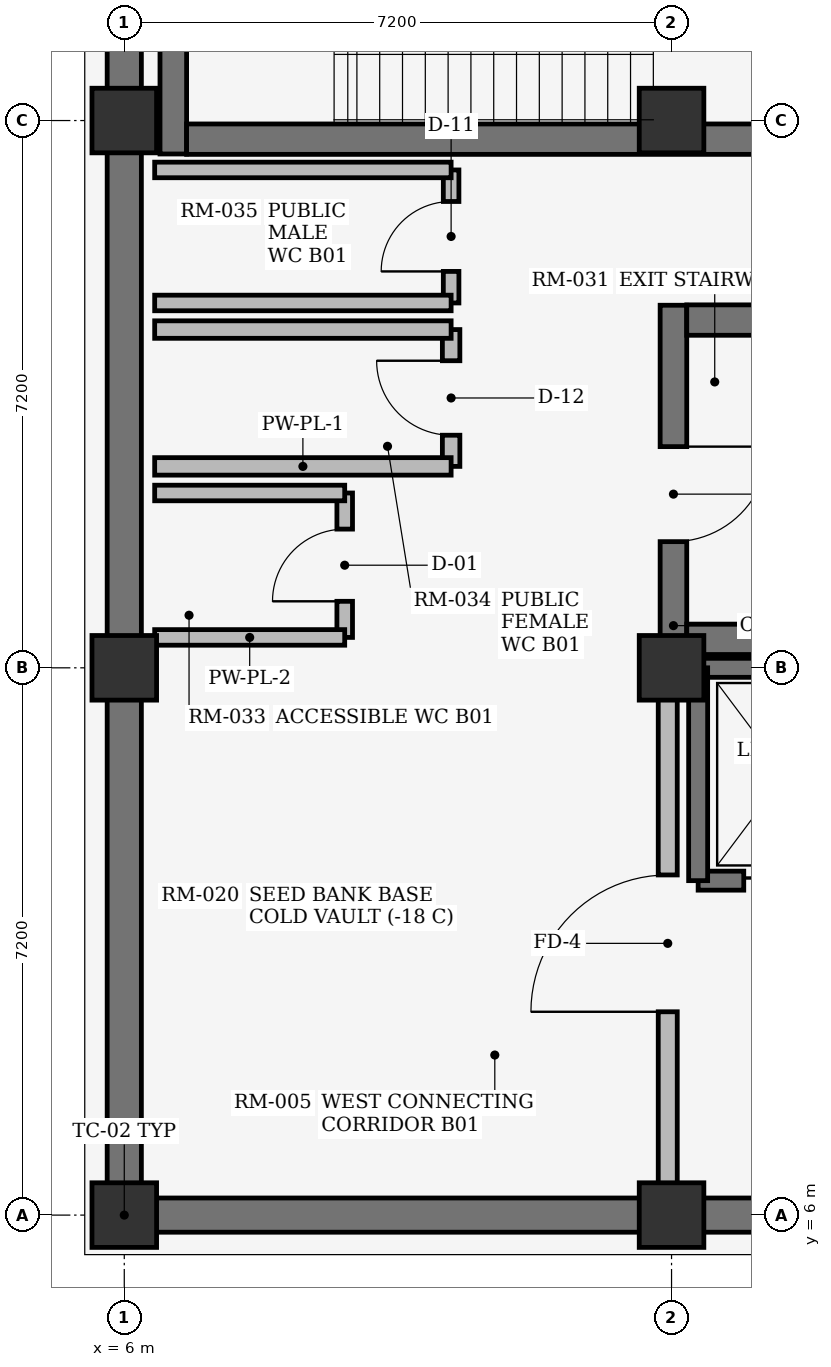
"""IFC4 building model, lengths in metres.
Left out: names, types, materials, properties, quantities, classifications, styles, units other than length and angle.
Written with IfcOpenShell. Run it as: python <this file> out.ifc"""

import sys

from ifc_helpers import new_model, si_unit, direction, frame, frame_2d, origin, origin_2d, place, context, subcontext, project, spatial, rectangle, extrude, element, fill, save


model = new_model("IFC4")
c1 = context("Model", 3, precision=1e-05, world=origin(), true_north=direction((0.0, 1.0)))
c2 = subcontext(c1, "Body", "Model", "MODEL_VIEW")
j1 = project(units=[si_unit("LENGTHUNIT", "METRE"), si_unit("PLANEANGLEUNIT", "RADIAN")], contexts=[c1])
p1 = place(None, origin())
s1 = spatial("IfcSite", under=j1, at=p1, CompositionType="ELEMENT")
p2 = place(p1, origin())
s2 = spatial("IfcBuilding", under=s1, at=p2, CompositionType="ELEMENT")
p3 = place(p2, frame((0.0, 0.0, -4.8)))
s3 = spatial("IfcBuildingStorey", under=s2, at=p3, CompositionType="ELEMENT", Elevation=-4.8)
for number, where, z_axis, x_axis in (
    (1, (6.0, 6.0, 0.0), (0.0, 0.0, 1.0), (1.0, 0.0, 0.0)),
    (2, (6.0, 13.2, 0.0), (0.0, 0.0, 1.0), (1.0, 0.0, 0.0)),
    (3, (6.0, 20.4, 0.0), (0.0, 0.0, 1.0), (1.0, 0.0, 0.0)),
    (4, (13.2, 6.0, 0.0), (0.0, 0.0, 1.0), (1.0, 0.0, 0.0)),
    (5, (13.2, 13.2, 0.0), (0.0, 0.0, 1.0), (1.0, 0.0, 0.0)),
    (6, (13.2, 20.4, 0.0), (0.0, 0.0, 1.0), (1.0, 0.0, 0.0)),
):
    element("IfcColumn", number, at=place(p3, frame(where, z_axis=z_axis, x_axis=x_axis)), inside=s3, PredefinedType="COLUMN", context=c2, shape_type="SweptSolid", body=[
        extrude(rectangle(XDim=0.85, YDim=0.85, at=origin_2d()), origin(), (0.0, 0.0, 1.0), 4.5),
    ])
p4 = place(p3, frame((6.0, 6.0, 0.0), z_axis=(0.0, 0.0, 1.0), x_axis=(1.0, 0.0, 0.0)))
e7 = element("IfcWall", 7, at=p4, inside=s3, PredefinedType="USERDEFINED", context=c2, shape_type="SweptSolid", body=[
    extrude(rectangle(XDim=36.0, YDim=0.45, at=frame_2d((18.0, 0.0))), origin(), (0.0, 0.0, 1.0), 4.5),
])
p5 = place(p3, frame((6.0, 34.8, 0.0), z_axis=(0.0, 0.0, 1.0), x_axis=(0.0, -1.0, 0.0)))
e8 = element("IfcWall", 8, at=p5, inside=s3, PredefinedType="USERDEFINED", context=c2, shape_type="SweptSolid", body=[
    extrude(rectangle(XDim=28.8, YDim=0.45, at=frame_2d((14.4, 0.0))), origin(), (0.0, 0.0, 1.0), 4.5),
])
p6 = place(p3, frame((13.225, 13.0, 0.0), z_axis=(0.0, 0.0, 1.0), x_axis=(0.0, 1.0, 0.0)))
e9 = element("IfcWall", 9, at=p6, inside=s3, PredefinedType="SHEAR", context=c2, shape_type="SweptSolid", body=[
    extrude(rectangle(XDim=4.97, YDim=0.35, at=frame_2d((2.485, 0.0))), origin(), (0.0, 0.0, 1.0), 4.5),
])
p7 = place(p6, frame((1.86, 0.0, 0.0)))
e10 = element("IfcOpeningElement", 10, at=p7, cuts=e9, PredefinedType="OPENING", context=c2, shape_type="SweptSolid", body=[
    extrude(rectangle(XDim=1.25, YDim=2.2, at=frame_2d((0.625, 1.1))), frame((0.0, 0.185, 0.0), z_axis=(0.0, -1.0, 0.0), x_axis=(1.0, 0.0, 0.0)), (0.0, 0.0, 1.0), 0.37),
])
for number, where, z_axis, x_axis in (
    (11, (13.4, 13.575, 0.0), (0.0, 0.0, 1.0), (1.0, 0.0, 0.0)),
    (12, (13.4, 17.775, 0.0), (0.0, 0.0, 1.0), (1.0, 0.0, 0.0)),
):
    element("IfcWall", number, at=place(p3, frame(where, z_axis=z_axis, x_axis=x_axis)), inside=s3, PredefinedType="SHEAR", context=c2, shape_type="SweptSolid", body=[
        extrude(rectangle(XDim=7.98, YDim=0.4, at=frame_2d((3.99, 0.0))), origin(), (0.0, 0.0, 1.0), 4.5),
    ])
p8 = place(p3, frame((6.645, 24.55, 0.0), z_axis=(0.0, 0.0, 1.0), x_axis=(0.0, -1.0, 0.0)))
e13 = element("IfcWall", 13, at=p8, inside=s3, PredefinedType="SHEAR", context=c2, shape_type="SweptSolid", body=[
    extrude(rectangle(XDim=4.59, YDim=0.35, at=frame_2d((2.295, 0.0))), origin(), (0.0, 0.0, 1.0), 4.5),
])
p9 = place(p3, frame((14.8, 20.155, 0.0), z_axis=(0.0, 0.0, 1.0), x_axis=(-1.0, 0.0, 0.0)))
e14 = element("IfcWall", 14, at=p9, inside=s3, PredefinedType="SHEAR", context=c2, shape_type="SweptSolid", body=[
    extrude(rectangle(XDim=7.98, YDim=0.4, at=frame_2d((3.99, 0.0))), origin(), (0.0, 0.0, 1.0), 4.5),
])
p10 = place(p3, frame((13.55, 10.4, 0.0), z_axis=(0.0, 0.0, 1.0), x_axis=(1.0, 0.0, 0.0)))
e15 = element("IfcWall", 15, at=p10, inside=s3, PredefinedType="SHEAR", context=c2, shape_type="SweptSolid", body=[
    extrude(rectangle(XDim=2.3, YDim=0.25, at=frame_2d((1.15, 0.0))), origin(), (0.0, 0.0, 1.0), 4.5),
])
p11 = place(p10, frame((0.6, 0.0, 0.0)))
e16 = element("IfcOpeningElement", 16, at=p11, cuts=e15, PredefinedType="OPENING", context=c2, shape_type="SweptSolid", body=[
    extrude(rectangle(XDim=1.1, YDim=2.2, at=frame_2d((0.55, 1.1))), frame((0.0, 0.135, 0.0), z_axis=(0.0, -1.0, 0.0), x_axis=(1.0, 0.0, 0.0)), (0.0, 0.0, 1.0), 0.27),
])
p12 = place(p3, frame((13.55, 13.2, 0.0), z_axis=(0.0, 0.0, 1.0), x_axis=(1.0, 0.0, 0.0)))
e17 = element("IfcWall", 17, at=p12, inside=s3, PredefinedType="SHEAR", context=c2, shape_type="SweptSolid", body=[
    extrude(rectangle(XDim=2.3, YDim=0.25, at=frame_2d((1.15, 0.0))), origin(), (0.0, 0.0, 1.0), 4.5),
])
p13 = place(p3, frame((13.55, 10.4, 0.0), z_axis=(0.0, 0.0, 1.0), x_axis=(0.0, 1.0, 0.0)))
e18 = element("IfcWall", 18, at=p13, inside=s3, PredefinedType="SHEAR", context=c2, shape_type="SweptSolid", body=[
    extrude(rectangle(XDim=2.8, YDim=0.25, at=frame_2d((1.4, 0.0))), origin(), (0.0, 0.0, 1.0), 4.5),
])
p14 = place(p3, frame((8.9, 13.6, 0.0), z_axis=(0.0, 0.0, 1.0), x_axis=(0.0, 1.0, 0.0)))
e19 = element("IfcWall", 19, at=p14, inside=s3, PredefinedType="PLUMBINGWALL", context=c2, shape_type="SweptSolid", body=[
    extrude(rectangle(XDim=1.9, YDim=0.205, at=frame_2d((0.95, 0.0))), origin(), (0.0, 0.0, 1.0), 4.48),
])
p15 = place(p14, frame((0.475, 0.0, 0.0)))
e20 = element("IfcOpeningElement", 20, at=p15, cuts=e19, PredefinedType="OPENING", context=c2, shape_type="SweptSolid", body=[
    extrude(rectangle(XDim=0.95, YDim=2.15, at=frame_2d((0.475, 1.075))), frame((0.0, 0.113, 0.0), z_axis=(0.0, -1.0, 0.0), x_axis=(1.0, 0.0, 0.0)), (0.0, 0.0, 1.0), 0.225),
])
for number, where, z_axis, x_axis in (
    (21, (6.4, 13.6, 0.0), (0.0, 0.0, 1.0), (1.0, 0.0, 0.0)),
    (22, (6.4, 15.5, 0.0), (0.0, 0.0, 1.0), (1.0, 0.0, 0.0)),
):
    element("IfcWall", number, at=place(p3, frame(where, z_axis=z_axis, x_axis=x_axis)), inside=s3, PredefinedType="PLUMBINGWALL", context=c2, shape_type="SweptSolid", body=[
        extrude(rectangle(XDim=2.5, YDim=0.205, at=frame_2d((1.25, 0.0))), origin(), (0.0, 0.0, 1.0), 4.48),
    ])
p16 = place(p3, frame((10.3, 15.85, 0.0), z_axis=(0.0, 0.0, 1.0), x_axis=(0.0, 1.0, 0.0)))
e23 = element("IfcWall", 23, at=p16, inside=s3, PredefinedType="PLUMBINGWALL", context=c2, shape_type="SweptSolid", body=[
    extrude(rectangle(XDim=1.8, YDim=0.23, at=frame_2d((0.9, 0.0))), origin(), (0.0, 0.0, 1.0), 4.48),
])
p17 = place(p16, frame((0.41, 0.0, 0.0)))
e24 = element("IfcOpeningElement", 24, at=p17, cuts=e23, PredefinedType="OPENING", context=c2, shape_type="SweptSolid", body=[
    extrude(rectangle(XDim=0.98, YDim=2.1, at=frame_2d((0.49, 1.05))), frame((0.0, 0.125, 0.0), z_axis=(0.0, -1.0, 0.0), x_axis=(1.0, 0.0, 0.0)), (0.0, 0.0, 1.0), 0.25),
])
for number, where, z_axis, x_axis in (
    (25, (6.4, 15.85, 0.0), (0.0, 0.0, 1.0), (1.0, 0.0, 0.0)),
    (26, (6.4, 17.65, 0.0), (0.0, 0.0, 1.0), (1.0, 0.0, 0.0)),
):
    element("IfcWall", number, at=place(p3, frame(where, z_axis=z_axis, x_axis=x_axis)), inside=s3, PredefinedType="PLUMBINGWALL", context=c2, shape_type="SweptSolid", body=[
        extrude(rectangle(XDim=3.9, YDim=0.23, at=frame_2d((1.95, 0.0))), origin(), (0.0, 0.0, 1.0), 4.48),
    ])
p18 = place(p3, frame((10.3, 18.0, 0.0), z_axis=(0.0, 0.0, 1.0), x_axis=(0.0, 1.0, 0.0)))
e27 = element("IfcWall", 27, at=p18, inside=s3, PredefinedType="PLUMBINGWALL", context=c2, shape_type="SweptSolid", body=[
    extrude(rectangle(XDim=1.75, YDim=0.205, at=frame_2d((0.875, 0.0))), origin(), (0.0, 0.0, 1.0), 4.48),
])
p19 = place(p18, frame((0.415, 0.0, 0.0)))
e28 = element("IfcOpeningElement", 28, at=p19, cuts=e27, PredefinedType="OPENING", context=c2, shape_type="SweptSolid", body=[
    extrude(rectangle(XDim=0.92, YDim=2.1, at=frame_2d((0.46, 1.05))), frame((0.0, 0.113, 0.0), z_axis=(0.0, -1.0, 0.0), x_axis=(1.0, 0.0, 0.0)), (0.0, 0.0, 1.0), 0.225),
])
for number, where, z_axis, x_axis in (
    (29, (6.4, 18.0, 0.0), (0.0, 0.0, 1.0), (1.0, 0.0, 0.0)),
    (30, (6.4, 19.75, 0.0), (0.0, 0.0, 1.0), (1.0, 0.0, 0.0)),
):
    element("IfcWall", number, at=place(p3, frame(where, z_axis=z_axis, x_axis=x_axis)), inside=s3, PredefinedType="PLUMBINGWALL", context=c2, shape_type="SweptSolid", body=[
        extrude(rectangle(XDim=3.9, YDim=0.205, at=frame_2d((1.95, 0.0))), origin(), (0.0, 0.0, 1.0), 4.48),
    ])
p20 = place(p3, frame((13.15, 6.05, 0.0), z_axis=(0.0, 0.0, 1.0), x_axis=(0.0, 1.0, 0.0)))
e31 = element("IfcWall", 31, at=p20, inside=s3, PredefinedType="SOLIDWALL", context=c2, shape_type="SweptSolid", body=[
    extrude(rectangle(XDim=7.05, YDim=0.25, at=frame_2d((3.525, 0.0))), origin(), (0.0, 0.0, 1.0), 3.89),
])
p21 = place(p20, frame((2.625, 0.0, 0.0)))
e32 = element("IfcOpeningElement", 32, at=p21, cuts=e31, PredefinedType="OPENING", context=c2, shape_type="SweptSolid", body=[
    extrude(rectangle(XDim=1.8, YDim=2.25, at=frame_2d((0.9, 1.125))), frame((0.0, 0.135, 0.0), z_axis=(0.0, -1.0, 0.0), x_axis=(1.0, 0.0, 0.0)), (0.0, 0.0, 1.0), 0.27),
])
p22 = place(p7, origin())
e33 = element("IfcDoor", 33, at=p22, inside=s3, OperationType="SINGLE_SWING_RIGHT", PredefinedType="DOOR", context=c2, shape_type="SweptSolid", body=[
    extrude(rectangle(XDim=1.25, YDim=2.2, at=frame_2d((0.625, 1.1))), frame((0.0, 0.025, 0.0), z_axis=(0.0, -1.0, 0.0), x_axis=(1.0, 0.0, 0.0)), (0.0, 0.0, 1.0), 0.05),
])
fill(e10, e33)
p23 = place(p11, origin())
e34 = element("IfcDoor", 34, at=p23, inside=s3, OperationType="DOUBLE_DOOR_SLIDING", PredefinedType="DOOR", context=c2, shape_type="SweptSolid", body=[
    extrude(rectangle(XDim=1.1, YDim=2.2, at=frame_2d((0.55, 1.1))), frame((0.0, 0.025, 0.0), z_axis=(0.0, -1.0, 0.0), x_axis=(1.0, 0.0, 0.0)), (0.0, 0.0, 1.0), 0.05),
])
fill(e16, e34)
p24 = place(p15, origin())
e35 = element("IfcDoor", 35, at=p24, inside=s3, OperationType="SINGLE_SWING_LEFT", PredefinedType="DOOR", context=c2, shape_type="SweptSolid", body=[
    extrude(rectangle(XDim=0.95, YDim=2.15, at=frame_2d((0.475, 1.075))), frame((0.0, 0.025, 0.0), z_axis=(0.0, -1.0, 0.0), x_axis=(1.0, 0.0, 0.0)), (0.0, 0.0, 1.0), 0.05),
])
fill(e20, e35)
p25 = place(p17, frame((0.98, 0.0, 0.0), z_axis=(0.0, 0.0, 1.0), x_axis=(-1.0, 0.0, 0.0)))
e36 = element("IfcDoor", 36, at=p25, inside=s3, OperationType="SINGLE_SWING_RIGHT", PredefinedType="DOOR", context=c2, shape_type="SweptSolid", body=[
    extrude(rectangle(XDim=0.98, YDim=2.1, at=frame_2d((0.49, 1.05))), frame((0.0, 0.025, 0.0), z_axis=(0.0, -1.0, 0.0), x_axis=(1.0, 0.0, 0.0)), (0.0, 0.0, 1.0), 0.05),
])
fill(e24, e36)
p26 = place(p19, origin())
e37 = element("IfcDoor", 37, at=p26, inside=s3, OperationType="SINGLE_SWING_LEFT", PredefinedType="DOOR", context=c2, shape_type="SweptSolid", body=[
    extrude(rectangle(XDim=0.92, YDim=2.1, at=frame_2d((0.46, 1.05))), frame((0.0, 0.025, 0.0), z_axis=(0.0, -1.0, 0.0), x_axis=(1.0, 0.0, 0.0)), (0.0, 0.0, 1.0), 0.05),
])
fill(e28, e37)
p27 = place(p21, origin())
e38 = element("IfcDoor", 38, at=p27, inside=s3, OperationType="DOUBLE_DOOR_SINGLE_SWING", PredefinedType="DOOR", context=c2, shape_type="SweptSolid", body=[
    extrude(rectangle(XDim=1.8, YDim=2.25, at=frame_2d((0.9, 1.125))), frame((0.0, 0.025, 0.0), z_axis=(0.0, -1.0, 0.0), x_axis=(1.0, 0.0, 0.0)), (0.0, 0.0, 1.0), 0.05),
])
fill(e32, e38)
save(model, sys.argv[1])
